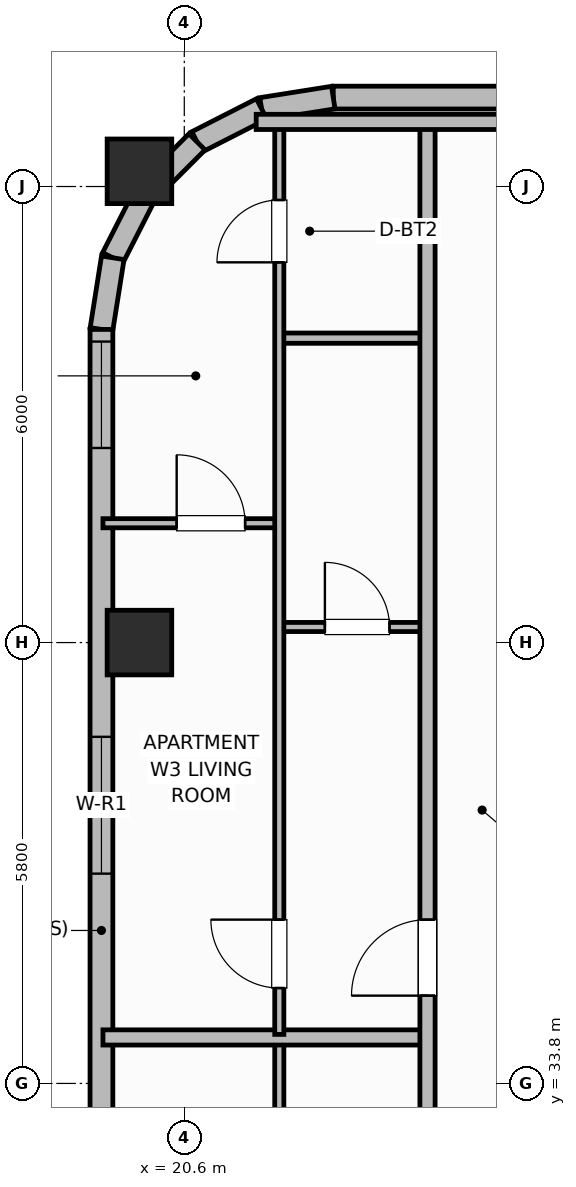
"""IFC4 building model, lengths in metres.
Left out: names, types, materials, properties, quantities, classifications, styles, units other than length and angle.
Written with IfcOpenShell. Run it as: python <this file> out.ifc"""

import sys

from ifc_helpers import new_model, si_unit, direction, frame, frame_2d, origin, origin_2d, place, context, subcontext, project, spatial, rectangle, extrude, element, fill, save


model = new_model("IFC4")
c1 = context("Model", 3, precision=1e-05, world=origin(), true_north=direction((0.0, 1.0)))
c2 = subcontext(c1, "Body", "Model", "MODEL_VIEW")
j1 = project(units=[si_unit("LENGTHUNIT", "METRE"), si_unit("PLANEANGLEUNIT", "RADIAN")], contexts=[c1])
p1 = place(None, origin())
s1 = spatial("IfcSite", under=j1, at=p1, CompositionType="ELEMENT")
p2 = place(p1, origin())
s2 = spatial("IfcBuilding", under=s1, at=p2, CompositionType="ELEMENT")
p3 = place(p2, frame((0.0, 0.0, 244.3)))
s3 = spatial("IfcBuildingStorey", under=s2, at=p3, CompositionType="ELEMENT", Elevation=244.3)
for number, where, z_axis, x_axis in (
    (1, (20.01, 39.6, 0.0), (0.0, 0.0, 1.0), (1.0, 0.0, 0.0)),
    (2, (20.01, 45.8, 0.0), (0.0, 0.0, 1.0), (1.0, 0.0, 0.0)),
):
    element("IfcColumn", number, at=place(p3, frame(where, z_axis=z_axis, x_axis=x_axis)), inside=s3, PredefinedType="COLUMN", context=c2, shape_type="SweptSolid", body=[
        extrude(rectangle(XDim=0.85, YDim=0.85, at=origin_2d()), origin(), (0.0, 0.0, 1.0), 3.7),
    ])
p4 = place(p3, frame((55.84, 46.77, 0.0), z_axis=(0.0, 0.0, 1.0), x_axis=(-1.0, 0.0, 0.0)))
e3 = element("IfcWall", 3, at=p4, inside=s3, PredefinedType="SOLIDWALL", context=c2, shape_type="SweptSolid", body=[
    extrude(rectangle(XDim=33.28, YDim=0.3, at=frame_2d((16.64, 0.0))), origin(), (0.0, 0.0, 1.0), 2.73),
])
p5 = place(p4, frame((4.93, 0.0, 0.71)))
e4 = element("IfcOpeningElement", 4, at=p5, cuts=e3, PredefinedType="OPENING", context=c2, shape_type="SweptSolid", body=[
    extrude(rectangle(XDim=2.1, YDim=1.9, at=frame_2d((1.05, 0.95))), frame((0.0, 0.16, 0.0), z_axis=(0.0, -1.0, 0.0), x_axis=(1.0, 0.0, 0.0)), (0.0, 0.0, 1.0), 0.32),
])
p6 = place(p4, frame((8.483, 0.0, 0.71)))
e5 = element("IfcOpeningElement", 5, at=p6, cuts=e3, PredefinedType="OPENING", context=c2, shape_type="SweptSolid", body=[
    extrude(rectangle(XDim=2.1, YDim=1.9, at=frame_2d((1.05, 0.95))), frame((0.0, 0.16, 0.0), z_axis=(0.0, -1.0, 0.0), x_axis=(1.0, 0.0, 0.0)), (0.0, 0.0, 1.0), 0.32),
])
p7 = place(p4, frame((15.59, 0.0, 0.71)))
e6 = element("IfcOpeningElement", 6, at=p7, cuts=e3, PredefinedType="OPENING", context=c2, shape_type="SweptSolid", body=[
    extrude(rectangle(XDim=2.1, YDim=1.9, at=frame_2d((1.05, 0.95))), frame((0.0, 0.16, 0.0), z_axis=(0.0, -1.0, 0.0), x_axis=(1.0, 0.0, 0.0)), (0.0, 0.0, 1.0), 0.32),
])
p8 = place(p4, frame((22.697, 0.0, 0.71)))
e7 = element("IfcOpeningElement", 7, at=p8, cuts=e3, PredefinedType="OPENING", context=c2, shape_type="SweptSolid", body=[
    extrude(rectangle(XDim=2.1, YDim=1.9, at=frame_2d((1.05, 0.95))), frame((0.0, 0.16, 0.0), z_axis=(0.0, -1.0, 0.0), x_axis=(1.0, 0.0, 0.0)), (0.0, 0.0, 1.0), 0.32),
])
p9 = place(p4, frame((26.25, 0.0, 0.71)))
e8 = element("IfcOpeningElement", 8, at=p9, cuts=e3, PredefinedType="OPENING", context=c2, shape_type="SweptSolid", body=[
    extrude(rectangle(XDim=2.1, YDim=1.9, at=frame_2d((1.05, 0.95))), frame((0.0, 0.16, 0.0), z_axis=(0.0, -1.0, 0.0), x_axis=(1.0, 0.0, 0.0)), (0.0, 0.0, 1.0), 0.32),
])
p10 = place(p3, frame((22.56, 46.77, 0.0), z_axis=(0.0, 0.0, 1.0), x_axis=(-0.987669453596, -0.156553666304, 0.0)))
e9 = element("IfcWall", 9, at=p10, inside=s3, PredefinedType="SOLIDWALL", context=c2, shape_type="SweptSolid", body=[
    extrude(rectangle(XDim=0.954, YDim=0.3, at=frame_2d((0.477, 0.0))), origin(), (0.0, 0.0, 1.0), 2.73),
])
p11 = place(p3, frame((21.617, 46.621, 0.0), z_axis=(0.0, 0.0, 1.0), x_axis=(-0.891023873617, -0.45395644796, 0.0)))
e10 = element("IfcWall", 10, at=p11, inside=s3, PredefinedType="SOLIDWALL", context=c2, shape_type="SweptSolid", body=[
    extrude(rectangle(XDim=0.954, YDim=0.3, at=frame_2d((0.477, 0.0))), origin(), (0.0, 0.0, 1.0), 2.73),
])
p12 = place(p3, frame((20.767, 46.188, 0.0), z_axis=(0.0, 0.0, 1.0), x_axis=(-0.707106781187, -0.707106781187, 0.0)))
e11 = element("IfcWall", 11, at=p12, inside=s3, PredefinedType="SOLIDWALL", context=c2, shape_type="SweptSolid", body=[
    extrude(rectangle(XDim=0.954, YDim=0.3, at=frame_2d((0.477, 0.0))), origin(), (0.0, 0.0, 1.0), 2.73),
])
p13 = place(p3, frame((20.093, 45.513, 0.0), z_axis=(0.0, 0.0, 1.0), x_axis=(-0.454159573051, -0.890920356825, 0.0)))
e12 = element("IfcWall", 12, at=p13, inside=s3, PredefinedType="SOLIDWALL", context=c2, shape_type="SweptSolid", body=[
    extrude(rectangle(XDim=0.954, YDim=0.3, at=frame_2d((0.477, 0.0))), origin(), (0.0, 0.0, 1.0), 2.73),
])
p14 = place(p3, frame((19.659, 44.663, 0.0), z_axis=(0.0, 0.0, 1.0), x_axis=(-0.156304114255, -0.987708977314, 0.0)))
e13 = element("IfcWall", 13, at=p14, inside=s3, PredefinedType="SOLIDWALL", context=c2, shape_type="SweptSolid", body=[
    extrude(rectangle(XDim=0.954, YDim=0.3, at=frame_2d((0.477, 0.0))), origin(), (0.0, 0.0, 1.0), 2.73),
])
p15 = place(p3, frame((19.51, 43.72, 0.0), z_axis=(0.0, 0.0, 1.0), x_axis=(0.0, -1.0, 0.0)))
e14 = element("IfcWall", 14, at=p15, inside=s3, PredefinedType="SOLIDWALL", context=c2, shape_type="SweptSolid", body=[
    extrude(rectangle(XDim=11.12, YDim=0.3, at=frame_2d((5.56, 0.0))), origin(), (0.0, 0.0, 1.0), 2.73),
])
p16 = place(p15, frame((0.16, 0.0, 0.72)))
e15 = element("IfcOpeningElement", 15, at=p16, cuts=e14, PredefinedType="OPENING", context=c2, shape_type="SweptSolid", body=[
    extrude(rectangle(XDim=1.4, YDim=1.85, at=frame_2d((0.7, 0.925))), frame((0.0, 0.16, 0.0), z_axis=(0.0, -1.0, 0.0), x_axis=(1.0, 0.0, 0.0)), (0.0, 0.0, 1.0), 0.32),
])
p17 = place(p15, frame((5.36, 0.0, 0.76)))
e16 = element("IfcOpeningElement", 16, at=p17, cuts=e14, PredefinedType="OPENING", context=c2, shape_type="SweptSolid", body=[
    extrude(rectangle(XDim=1.8, YDim=1.85, at=frame_2d((0.9, 0.925))), frame((0.0, 0.16, 0.0), z_axis=(0.0, -1.0, 0.0), x_axis=(1.0, 0.0, 0.0)), (0.0, 0.0, 1.0), 0.32),
])
p18 = place(p3, frame((21.85, 22.74, 0.0), z_axis=(0.0, 0.0, 1.0), x_axis=(0.0, 1.0, 0.0)))
e17 = element("IfcWall", 17, at=p18, inside=s3, PredefinedType="PARTITIONING", context=c2, shape_type="SweptSolid", body=[
    extrude(rectangle(XDim=11.625, YDim=0.12, at=frame_2d((5.812, 0.0))), origin(), (0.0, 0.0, 1.0), 2.56),
])
p19 = place(p18, frame((0.61, 0.0, 0.0)))
e18 = element("IfcOpeningElement", 18, at=p19, cuts=e17, PredefinedType="OPENING", context=c2, shape_type="SweptSolid", body=[
    extrude(rectangle(XDim=0.9, YDim=2.1, at=frame_2d((0.45, 1.05))), frame((0.0, 0.07, 0.0), z_axis=(0.0, -1.0, 0.0), x_axis=(1.0, 0.0, 0.0)), (0.0, 0.0, 1.0), 0.14),
])
p20 = place(p3, frame((19.53, 34.405, 0.0), z_axis=(0.0, 0.0, 1.0), x_axis=(1.0, 0.0, 0.0)))
e19 = element("IfcWall", 19, at=p20, inside=s3, PredefinedType="PARTITIONING", context=c2, shape_type="SweptSolid", body=[
    extrude(rectangle(XDim=4.27, YDim=0.2, at=frame_2d((2.135, 0.0))), origin(), (0.0, 0.0, 1.0), 2.56),
])
p21 = place(p3, frame((21.85, 39.805, 0.0), z_axis=(0.0, 0.0, 1.0), x_axis=(1.0, 0.0, 0.0)))
e20 = element("IfcWall", 20, at=p21, inside=s3, PredefinedType="PARTITIONING", context=c2, shape_type="SweptSolid", body=[
    extrude(rectangle(XDim=1.95, YDim=0.12, at=frame_2d((0.975, 0.0))), origin(), (0.0, 0.0, 1.0), 2.56),
])
p22 = place(p21, frame((0.6, 0.0, 0.0)))
e21 = element("IfcOpeningElement", 21, at=p22, cuts=e20, PredefinedType="OPENING", context=c2, shape_type="SweptSolid", body=[
    extrude(rectangle(XDim=0.85, YDim=2.1, at=frame_2d((0.425, 1.05))), frame((0.0, 0.07, 0.0), z_axis=(0.0, -1.0, 0.0), x_axis=(1.0, 0.0, 0.0)), (0.0, 0.0, 1.0), 0.14),
])
p23 = place(p3, frame((21.85, 43.605, 0.0), z_axis=(0.0, 0.0, 1.0), x_axis=(1.0, 0.0, 0.0)))
e22 = element("IfcWall", 22, at=p23, inside=s3, PredefinedType="PARTITIONING", context=c2, shape_type="SweptSolid", body=[
    extrude(rectangle(XDim=1.95, YDim=0.135, at=frame_2d((0.975, 0.0))), origin(), (0.0, 0.0, 1.0), 2.56),
])
p24 = place(p3, frame((19.53, 41.17, 0.0), z_axis=(0.0, 0.0, 1.0), x_axis=(1.0, 0.0, 0.0)))
e23 = element("IfcWall", 23, at=p24, inside=s3, PredefinedType="PARTITIONING", context=c2, shape_type="SweptSolid", body=[
    extrude(rectangle(XDim=2.32, YDim=0.12, at=frame_2d((1.16, 0.0))), origin(), (0.0, 0.0, 1.0), 2.56),
])
p25 = place(p24, frame((0.97, 0.0, 0.0)))
e24 = element("IfcOpeningElement", 24, at=p25, cuts=e23, PredefinedType="OPENING", context=c2, shape_type="SweptSolid", body=[
    extrude(rectangle(XDim=0.9, YDim=2.1, at=frame_2d((0.45, 1.05))), frame((0.0, 0.07, 0.0), z_axis=(0.0, -1.0, 0.0), x_axis=(1.0, 0.0, 0.0)), (0.0, 0.0, 1.0), 0.14),
])
p26 = place(p3, frame((21.85, 34.445, 0.0), z_axis=(0.0, 0.0, 1.0), x_axis=(0.0, 1.0, 0.0)))
e25 = element("IfcWall", 25, at=p26, inside=s3, PredefinedType="PARTITIONING", context=c2, shape_type="SweptSolid", body=[
    extrude(rectangle(XDim=11.965, YDim=0.12, at=frame_2d((5.982, 0.0))), origin(), (0.0, 0.0, 1.0), 2.56),
])
p27 = place(p26, frame((0.61, 0.0, 0.0)))
e26 = element("IfcOpeningElement", 26, at=p27, cuts=e25, PredefinedType="OPENING", context=c2, shape_type="SweptSolid", body=[
    extrude(rectangle(XDim=0.9, YDim=2.1, at=frame_2d((0.45, 1.05))), frame((0.0, 0.07, 0.0), z_axis=(0.0, -1.0, 0.0), x_axis=(1.0, 0.0, 0.0)), (0.0, 0.0, 1.0), 0.14),
])
p28 = place(p26, frame((10.157, 0.0, 0.0)))
e27 = element("IfcOpeningElement", 27, at=p28, cuts=e25, PredefinedType="OPENING", context=c2, shape_type="SweptSolid", body=[
    extrude(rectangle(XDim=0.82, YDim=2.08, at=frame_2d((0.41, 1.04))), frame((0.0, 0.07, 0.0), z_axis=(0.0, -1.0, 0.0), x_axis=(1.0, 0.0, 0.0)), (0.0, 0.0, 1.0), 0.14),
])
p29 = place(p3, frame((23.8, 9.95, 0.0), z_axis=(0.0, 0.0, 1.0), x_axis=(0.0, 1.0, 0.0)))
e28 = element("IfcWall", 28, at=p29, inside=s3, PredefinedType="PARTITIONING", context=c2, shape_type="SweptSolid", body=[
    extrude(rectangle(XDim=36.5, YDim=0.2, at=frame_2d((18.25, 0.0))), origin(), (0.0, 0.0, 1.0), 2.56),
])
p30 = place(p29, frame((3.25, 0.0, 0.0)))
e29 = element("IfcOpeningElement", 29, at=p30, cuts=e28, PredefinedType="OPENING", context=c2, shape_type="SweptSolid", body=[
    extrude(rectangle(XDim=1.0, YDim=2.15, at=frame_2d((0.5, 1.075))), frame((0.0, 0.11, 0.0), z_axis=(0.0, -1.0, 0.0), x_axis=(1.0, 0.0, 0.0)), (0.0, 0.0, 1.0), 0.22),
])
p31 = place(p29, frame((13.3, 0.0, 0.0)))
e30 = element("IfcOpeningElement", 30, at=p31, cuts=e28, PredefinedType="OPENING", context=c2, shape_type="SweptSolid", body=[
    extrude(rectangle(XDim=1.0, YDim=2.15, at=frame_2d((0.5, 1.075))), frame((0.0, 0.11, 0.0), z_axis=(0.0, -1.0, 0.0), x_axis=(1.0, 0.0, 0.0)), (0.0, 0.0, 1.0), 0.22),
])
p32 = place(p29, frame((25.005, 0.0, 0.0)))
e31 = element("IfcOpeningElement", 31, at=p32, cuts=e28, PredefinedType="OPENING", context=c2, shape_type="SweptSolid", body=[
    extrude(rectangle(XDim=1.0, YDim=2.15, at=frame_2d((0.5, 1.075))), frame((0.0, 0.11, 0.0), z_axis=(0.0, -1.0, 0.0), x_axis=(1.0, 0.0, 0.0)), (0.0, 0.0, 1.0), 0.22),
])
p33 = place(p3, frame((21.546, 46.45, 0.0), z_axis=(0.0, 0.0, 1.0), x_axis=(1.0, 0.0, 0.0)))
e32 = element("IfcWall", 32, at=p33, inside=s3, PredefinedType="PARTITIONING", context=c2, shape_type="SweptSolid", body=[
    extrude(rectangle(XDim=3.754, YDim=0.2, at=frame_2d((1.877, 0.0))), origin(), (0.0, 0.0, 1.0), 2.56),
])
p34 = place(p16, origin())
e33 = element("IfcWindow", 33, at=p34, inside=s3, PartitioningType="SINGLE_PANEL", PredefinedType="WINDOW", context=c2, shape_type="SweptSolid", body=[
    extrude(rectangle(XDim=1.4, YDim=1.85, at=frame_2d((0.7, 0.925))), frame((0.0, 0.03, 0.0), z_axis=(0.0, -1.0, 0.0), x_axis=(1.0, 0.0, 0.0)), (0.0, 0.0, 1.0), 0.06),
])
fill(e15, e33)
p35 = place(p17, origin())
e34 = element("IfcWindow", 34, at=p35, inside=s3, PartitioningType="SINGLE_PANEL", PredefinedType="WINDOW", context=c2, shape_type="SweptSolid", body=[
    extrude(rectangle(XDim=1.8, YDim=1.85, at=frame_2d((0.9, 0.925))), frame((0.0, 0.03, 0.0), z_axis=(0.0, -1.0, 0.0), x_axis=(1.0, 0.0, 0.0)), (0.0, 0.0, 1.0), 0.06),
])
fill(e16, e34)
p36 = place(p22, origin())
e35 = element("IfcDoor", 35, at=p36, inside=s3, OperationType="SINGLE_SWING_LEFT", PredefinedType="DOOR", context=c2, shape_type="SweptSolid", body=[
    extrude(rectangle(XDim=0.85, YDim=2.1, at=frame_2d((0.425, 1.05))), frame((0.0, 0.025, 0.0), z_axis=(0.0, -1.0, 0.0), x_axis=(1.0, 0.0, 0.0)), (0.0, 0.0, 1.0), 0.05),
])
fill(e21, e35)
p37 = place(p25, origin())
e36 = element("IfcDoor", 36, at=p37, inside=s3, OperationType="SINGLE_SWING_LEFT", PredefinedType="DOOR", context=c2, shape_type="SweptSolid", body=[
    extrude(rectangle(XDim=0.9, YDim=2.1, at=frame_2d((0.45, 1.05))), frame((0.0, 0.025, 0.0), z_axis=(0.0, -1.0, 0.0), x_axis=(1.0, 0.0, 0.0)), (0.0, 0.0, 1.0), 0.05),
])
fill(e24, e36)
p38 = place(p27, origin())
e37 = element("IfcDoor", 37, at=p38, inside=s3, OperationType="SINGLE_SWING_RIGHT", PredefinedType="DOOR", context=c2, shape_type="SweptSolid", body=[
    extrude(rectangle(XDim=0.9, YDim=2.1, at=frame_2d((0.45, 1.05))), frame((0.0, 0.025, 0.0), z_axis=(0.0, -1.0, 0.0), x_axis=(1.0, 0.0, 0.0)), (0.0, 0.0, 1.0), 0.05),
])
fill(e26, e37)
p39 = place(p28, origin())
e38 = element("IfcDoor", 38, at=p39, inside=s3, OperationType="SINGLE_SWING_LEFT", PredefinedType="DOOR", context=c2, shape_type="SweptSolid", body=[
    extrude(rectangle(XDim=0.82, YDim=2.08, at=frame_2d((0.41, 1.04))), frame((0.0, 0.025, 0.0), z_axis=(0.0, -1.0, 0.0), x_axis=(1.0, 0.0, 0.0)), (0.0, 0.0, 1.0), 0.05),
])
fill(e27, e38)
p40 = place(p32, origin())
e39 = element("IfcDoor", 39, at=p40, inside=s3, OperationType="SINGLE_SWING_LEFT", PredefinedType="DOOR", context=c2, shape_type="SweptSolid", body=[
    extrude(rectangle(XDim=1.0, YDim=2.15, at=frame_2d((0.5, 1.075))), frame((0.0, 0.025, 0.0), z_axis=(0.0, -1.0, 0.0), x_axis=(1.0, 0.0, 0.0)), (0.0, 0.0, 1.0), 0.05),
])
fill(e31, e39)
save(model, sys.argv[1])
